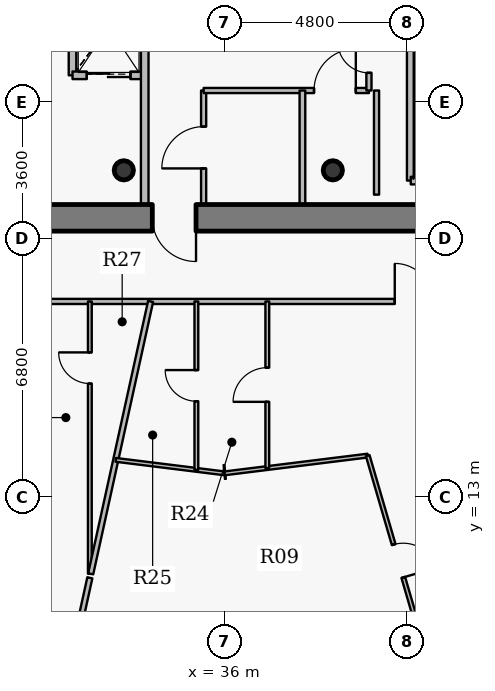
"""IFC4 building model, lengths in metres.
Left out: names, types, materials, properties, quantities, classifications, styles, units other than length and angle.
Written with IfcOpenShell. Run it as: python <this file> out.ifc"""

import sys

from ifc_helpers import new_model, si_unit, direction, frame, frame_2d, origin, origin_2d, place, context, subcontext, project, spatial, rectangle, hollow_circle, extrude, source, transform, mapped, element, fill, save


model = new_model("IFC4")
c1 = context("Model", 3, precision=1e-05, world=origin(), true_north=direction((0.0, 1.0)))
c2 = subcontext(c1, "Body", "Model", "MODEL_VIEW")
j1 = project(units=[si_unit("LENGTHUNIT", "METRE"), si_unit("PLANEANGLEUNIT", "RADIAN")], contexts=[c1])
p1 = place(None, origin())
s1 = spatial("IfcSite", under=j1, at=p1, CompositionType="ELEMENT")
p2 = place(p1, origin())
s2 = spatial("IfcBuilding", under=s1, at=p2, CompositionType="ELEMENT")
p3 = place(p2, frame((0.0, 0.0, 214.05)))
s3 = spatial("IfcBuildingStorey", under=s2, at=p3, CompositionType="ELEMENT", Elevation=214.05)
for number, where, z_axis, x_axis in (
    (1, (33.35, 21.6, 0.0), (0.0, 0.0, 1.0), (1.0, 0.0, 0.0)),
    (2, (38.85, 21.6, 0.0), (0.0, 0.0, 1.0), (1.0, 0.0, 0.0)),
):
    element("IfcColumn", number, at=place(p3, frame(where, z_axis=z_axis, x_axis=x_axis)), inside=s3, PredefinedType="COLUMN", context=c2, shape_type="SweptSolid", body=[
        extrude(hollow_circle(Radius=0.254, WallThickness=0.02, at=origin_2d()), origin(), (0.0, 0.0, 1.0), 3.75),
    ])
p4 = place(p3, frame((44.95, 20.35, 0.0), z_axis=(0.0, 0.0, 1.0), x_axis=(-1.0, 0.0, 0.0)))
e3 = element("IfcWall", 3, at=p4, inside=s3, PredefinedType="SHEAR", context=c2, shape_type="SweptSolid", body=[
    extrude(rectangle(XDim=17.9, YDim=0.7, at=frame_2d((8.95, 0.0))), origin(), (0.0, 0.0, 1.0), 3.05),
])
p5 = place(p4, frame((9.7, 0.0, 0.0)))
e4 = element("IfcOpeningElement", 4, at=p5, cuts=e3, PredefinedType="OPENING", context=c2, shape_type="SweptSolid", body=[
    extrude(rectangle(XDim=1.15, YDim=2.15, at=origin_2d()), frame((0.575, 0.36, 1.075), z_axis=(0.0, -1.0, 0.0), x_axis=(1.0, 0.0, 0.0)), (0.0, 0.0, 1.0), 0.72),
])
p6 = place(p3, frame((24.35, 18.15, 0.0), z_axis=(0.0, 0.0, 1.0), x_axis=(1.0, 0.0, 0.0)))
e5 = element("IfcWall", 5, at=p6, inside=s3, PredefinedType="PARTITIONING", context=c2, shape_type="SweptSolid", body=[
    extrude(rectangle(XDim=23.85, YDim=0.135, at=frame_2d((11.925, 0.0))), origin(), (0.0, 0.0, 1.0), 2.935),
])
p7 = place(p6, frame((2.87, 0.0, 0.0)))
e6 = element("IfcOpeningElement", 6, at=p7, cuts=e5, PredefinedType="OPENING", context=c2, shape_type="SweptSolid", body=[
    extrude(rectangle(XDim=1.0, YDim=2.15, at=origin_2d()), frame((0.5, 0.078, 1.075), z_axis=(0.0, -1.0, 0.0), x_axis=(1.0, 0.0, 0.0)), (0.0, 0.0, 1.0), 0.155),
])
p8 = place(p6, frame((16.13, 0.0, 0.0)))
e7 = element("IfcOpeningElement", 7, at=p8, cuts=e5, PredefinedType="OPENING", context=c2, shape_type="SweptSolid", body=[
    extrude(rectangle(XDim=1.0, YDim=2.15, at=origin_2d()), frame((0.5, 0.078, 1.075), z_axis=(0.0, -1.0, 0.0), x_axis=(1.0, 0.0, 0.0)), (0.0, 0.0, 1.0), 0.155),
])
p9 = place(p3, frame((31.891, 8.307, 0.0), z_axis=(0.0, 0.0, 1.0), x_axis=(0.214700779338, 0.976679873526, 0.0)))
e8 = element("IfcWall", 8, at=p9, inside=s3, PredefinedType="PARTITIONING", context=c2, shape_type="SweptSolid", body=[
    extrude(rectangle(XDim=2.632, YDim=0.135, at=frame_2d((1.316, 0.0))), origin(), (0.0, 0.0, 1.0), 2.985),
])
p10 = place(p3, frame((32.0, 24.1, 0.0), z_axis=(0.0, 0.0, 1.0), x_axis=(0.0, 1.0, 0.0)))
e9 = element("IfcWall", 9, at=p10, inside=s3, PredefinedType="PARTITIONING", context=c2, shape_type="SweptSolid", body=[
    extrude(rectangle(XDim=8.0, YDim=0.2, at=frame_2d((4.0, 0.0))), origin(), (0.0, 0.0, 1.0), 3.5),
])
p11 = place(p3, frame((32.0, 24.1, 0.0), z_axis=(0.0, 0.0, 1.0), x_axis=(1.0, 0.0, 0.0)))
e10 = element("IfcWall", 10, at=p11, inside=s3, PredefinedType="PARTITIONING", context=c2, shape_type="SweptSolid", body=[
    extrude(rectangle(XDim=1.9, YDim=0.2, at=frame_2d((0.95, 0.0))), origin(), (0.0, 0.0, 1.0), 3.085),
])
p12 = place(p11, frame((0.375, 0.0, 0.0)))
e11 = element("IfcOpeningElement", 11, at=p12, cuts=e10, PredefinedType="OPENING", context=c2, shape_type="SweptSolid", body=[
    extrude(rectangle(XDim=1.15, YDim=2.15, at=origin_2d()), frame((0.575, 0.11, 1.075), z_axis=(0.0, -1.0, 0.0), x_axis=(1.0, 0.0, 0.0)), (0.0, 0.0, 1.0), 0.22),
])
p13 = place(p3, frame((32.456, 10.985, 0.0), z_axis=(0.0, 0.0, 1.0), x_axis=(0.0, 1.0, 0.0)))
e12 = element("IfcWall", 12, at=p13, inside=s3, PredefinedType="PARTITIONING", context=c2, shape_type="SweptSolid", body=[
    extrude(rectangle(XDim=7.165, YDim=0.1, at=frame_2d((3.582, 0.0))), origin(), (0.0, 0.0, 1.0), 3.5),
])
p14 = place(p13, frame((5.004, 0.0, 0.0)))
e13 = element("IfcOpeningElement", 13, at=p14, cuts=e12, PredefinedType="OPENING", context=c2, shape_type="SweptSolid", body=[
    extrude(rectangle(XDim=0.82, YDim=2.1, at=origin_2d()), frame((0.41, 0.06, 1.05), z_axis=(0.0, -1.0, 0.0), x_axis=(1.0, 0.0, 0.0)), (0.0, 0.0, 1.0), 0.12),
])
p15 = place(p3, frame((32.479, 10.983, 0.0), z_axis=(0.0, 0.0, 1.0), x_axis=(0.214685976808, 0.976683127407, 0.0)))
e14 = element("IfcWall", 14, at=p15, inside=s3, PredefinedType="PARTITIONING", context=c2, shape_type="SweptSolid", body=[
    extrude(rectangle(XDim=7.338, YDim=0.135, at=frame_2d((3.669, 0.0))), origin(), (0.0, 0.0, 1.0), 3.5),
])
p16 = place(p3, frame((33.138, 13.981, 0.0), z_axis=(0.0, 0.0, 1.0), x_axis=(0.99239465631, -0.123096897311, 0.0)))
e15 = element("IfcWall", 15, at=p16, inside=s3, PredefinedType="PARTITIONING", context=c2, shape_type="SweptSolid", body=[
    extrude(rectangle(XDim=2.884, YDim=0.1, at=frame_2d((1.442, 0.0))), origin(), (0.0, 0.0, 1.0), 2.935),
])
p17 = place(p3, frame((33.9, 20.7, 0.0), z_axis=(0.0, 0.0, 1.0), x_axis=(0.0, 1.0, 0.0)))
e16 = element("IfcWall", 16, at=p17, inside=s3, PredefinedType="PARTITIONING", context=c2, shape_type="SweptSolid", body=[
    extrude(rectangle(XDim=11.4, YDim=0.2, at=frame_2d((5.7, 0.0))), origin(), (0.0, 0.0, 1.0), 3.085),
])
p18 = place(p17, frame((7.08, 0.0, 0.0)))
e17 = element("IfcOpeningElement", 17, at=p18, cuts=e16, PredefinedType="OPENING", context=c2, shape_type="SweptSolid", body=[
    extrude(rectangle(XDim=1.05, YDim=2.15, at=origin_2d()), frame((0.525, 0.11, 1.075), z_axis=(0.0, -1.0, 0.0), x_axis=(1.0, 0.0, 0.0)), (0.0, 0.0, 1.0), 0.22),
])
p19 = place(p17, frame((8.595, 0.0, 0.0)))
e18 = element("IfcOpeningElement", 18, at=p19, cuts=e16, PredefinedType="OPENING", context=c2, shape_type="SweptSolid", body=[
    extrude(rectangle(XDim=1.05, YDim=2.15, at=origin_2d()), frame((0.525, 0.11, 1.075), z_axis=(0.0, -1.0, 0.0), x_axis=(1.0, 0.0, 0.0)), (0.0, 0.0, 1.0), 0.22),
])
p20 = place(p17, frame((10.095, 0.0, 0.0)))
e19 = element("IfcOpeningElement", 19, at=p20, cuts=e16, PredefinedType="OPENING", context=c2, shape_type="SweptSolid", body=[
    extrude(rectangle(XDim=1.05, YDim=2.15, at=origin_2d()), frame((0.525, 0.11, 1.075), z_axis=(0.0, -1.0, 0.0), x_axis=(1.0, 0.0, 0.0)), (0.0, 0.0, 1.0), 0.22),
])
p21 = place(p3, frame((35.259, 13.718, 0.0), z_axis=(0.0, 0.0, 1.0), x_axis=(0.0, 1.0, 0.0)))
e20 = element("IfcWall", 20, at=p21, inside=s3, PredefinedType="PARTITIONING", context=c2, shape_type="SweptSolid", body=[
    extrude(rectangle(XDim=4.432, YDim=0.1, at=frame_2d((2.216, 0.0))), origin(), (0.0, 0.0, 1.0), 3.5),
])
p22 = place(p21, frame((1.806, 0.0, 0.0)))
e21 = element("IfcOpeningElement", 21, at=p22, cuts=e20, PredefinedType="OPENING", context=c2, shape_type="SweptSolid", body=[
    extrude(rectangle(XDim=0.82, YDim=2.1, at=origin_2d()), frame((0.41, 0.06, 1.05), z_axis=(0.0, -1.0, 0.0), x_axis=(1.0, 0.0, 0.0)), (0.0, 0.0, 1.0), 0.12),
])
p23 = place(p3, frame((35.45, 20.7, 0.0), z_axis=(0.0, 0.0, 1.0), x_axis=(0.0, 1.0, 0.0)))
e22 = element("IfcWall", 22, at=p23, inside=s3, PredefinedType="PARTITIONING", context=c2, shape_type="SweptSolid", body=[
    extrude(rectangle(XDim=3.0, YDim=0.135, at=frame_2d((1.5, 0.0))), origin(), (0.0, 0.0, 1.0), 3.085),
])
p24 = place(p23, frame((0.95, 0.0, 0.0)))
e23 = element("IfcOpeningElement", 23, at=p24, cuts=e22, PredefinedType="OPENING", context=c2, shape_type="SweptSolid", body=[
    extrude(rectangle(XDim=1.1, YDim=2.15, at=origin_2d()), frame((0.55, 0.078, 1.075), z_axis=(0.0, -1.0, 0.0), x_axis=(1.0, 0.0, 0.0)), (0.0, 0.0, 1.0), 0.155),
])
p25 = place(p3, frame((35.45, 23.7, 0.0), z_axis=(0.0, 0.0, 1.0), x_axis=(1.0, 0.0, 0.0)))
e24 = element("IfcWall", 24, at=p25, inside=s3, PredefinedType="PARTITIONING", context=c2, shape_type="SweptSolid", body=[
    extrude(rectangle(XDim=4.35, YDim=0.135, at=frame_2d((2.175, 0.0))), origin(), (0.0, 0.0, 1.0), 3.085),
])
p26 = place(p25, frame((2.905, 0.0, 0.0)))
e25 = element("IfcOpeningElement", 25, at=p26, cuts=e24, PredefinedType="OPENING", context=c2, shape_type="SweptSolid", body=[
    extrude(rectangle(XDim=1.1, YDim=2.15, at=origin_2d()), frame((0.55, 0.078, 1.075), z_axis=(0.0, -1.0, 0.0), x_axis=(1.0, 0.0, 0.0)), (0.0, 0.0, 1.0), 0.155),
])
p27 = place(p3, frame((36.0, 13.626, 0.0), z_axis=(0.0, 0.0, 1.0), x_axis=(0.992397118202, 0.123077048159, 0.0)))
e26 = element("IfcWall", 26, at=p27, inside=s3, PredefinedType="PARTITIONING", context=c2, shape_type="SweptSolid", body=[
    extrude(rectangle(XDim=3.797, YDim=0.1, at=frame_2d((1.898, 0.0))), origin(), (0.0, 0.0, 1.0), 2.935),
])
p28 = place(p3, frame((37.126, 13.766, 0.0), z_axis=(0.0, 0.0, 1.0), x_axis=(0.0, 1.0, 0.0)))
e27 = element("IfcWall", 27, at=p28, inside=s3, PredefinedType="PARTITIONING", context=c2, shape_type="SweptSolid", body=[
    extrude(rectangle(XDim=4.384, YDim=0.1, at=frame_2d((2.192, 0.0))), origin(), (0.0, 0.0, 1.0), 3.185),
])
p29 = place(p28, frame((1.742, 0.0, 0.0)))
e28 = element("IfcOpeningElement", 28, at=p29, cuts=e27, PredefinedType="OPENING", context=c2, shape_type="SweptSolid", body=[
    extrude(rectangle(XDim=0.9, YDim=2.1, at=origin_2d()), frame((0.45, 0.06, 1.05), z_axis=(0.0, -1.0, 0.0), x_axis=(1.0, 0.0, 0.0)), (0.0, 0.0, 1.0), 0.12),
])
p30 = place(p3, frame((38.05, 20.18, 0.0), z_axis=(0.0, 0.0, 1.0), x_axis=(0.0, 1.0, 0.0)))
e29 = element("IfcWall", 29, at=p30, inside=s3, PredefinedType="PARTITIONING", context=c2, shape_type="SweptSolid", body=[
    extrude(rectangle(XDim=3.52, YDim=0.15, at=frame_2d((1.76, 0.0))), origin(), (0.0, 0.0, 1.0), 3.035),
])
p31 = place(p3, frame((39.768, 14.094, 0.0), z_axis=(0.0, 0.0, 1.0), x_axis=(0.280219030024, -0.959936089129, 0.0)))
e30 = element("IfcWall", 30, at=p31, inside=s3, PredefinedType="PARTITIONING", context=c2, shape_type="SweptSolid", body=[
    extrude(rectangle(XDim=5.778, YDim=0.1, at=frame_2d((2.889, 0.0))), origin(), (0.0, 0.0, 1.0), 2.985),
])
p32 = place(p31, frame((2.439, 0.0, 0.0)))
e31 = element("IfcOpeningElement", 31, at=p32, cuts=e30, PredefinedType="OPENING", context=c2, shape_type="SweptSolid", body=[
    extrude(rectangle(XDim=0.9, YDim=2.1, at=origin_2d()), frame((0.45, 0.06, 1.05), z_axis=(0.0, -1.0, 0.0), x_axis=(1.0, 0.0, 0.0)), (0.0, 0.0, 1.0), 0.12),
])
p33 = place(p3, frame((39.8, 23.7, 0.0), z_axis=(0.0, 0.0, 1.0), x_axis=(0.0, 1.0, 0.0)))
e32 = element("IfcWall", 32, at=p33, inside=s3, PredefinedType="PARTITIONING", context=c2, shape_type="SweptSolid", body=[
    extrude(rectangle(XDim=1.75, YDim=0.135, at=frame_2d((0.875, 0.0))), origin(), (0.0, 0.0, 1.0), 3.5),
])
p34 = place(p33, frame((0.465, 0.0, 0.0)))
e33 = element("IfcOpeningElement", 33, at=p34, cuts=e32, PredefinedType="OPENING", context=c2, shape_type="SweptSolid", body=[
    extrude(rectangle(XDim=0.82, YDim=2.1, at=origin_2d()), frame((0.41, 0.078, 1.05), z_axis=(0.0, -1.0, 0.0), x_axis=(1.0, 0.0, 0.0)), (0.0, 0.0, 1.0), 0.155),
])
p35 = place(p3, frame((40.9, 21.33, 0.0), z_axis=(0.0, 0.0, 1.0), x_axis=(0.0, 1.0, 0.0)))
e34 = element("IfcWall", 34, at=p35, inside=s3, PredefinedType="PARTITIONING", context=c2, shape_type="SweptSolid", body=[
    extrude(rectangle(XDim=5.91, YDim=0.2, at=frame_2d((2.955, 0.0))), origin(), (0.0, 0.0, 1.0), 3.035),
])
p36 = place(p3, frame((40.9, 21.33, 0.0), z_axis=(0.0, 0.0, 1.0), x_axis=(1.0, 0.0, 0.0)))
e35 = element("IfcWall", 35, at=p36, inside=s3, PredefinedType="PARTITIONING", context=c2, shape_type="SweptSolid", body=[
    extrude(rectangle(XDim=0.25, YDim=0.2, at=frame_2d((0.125, 0.0))), origin(), (0.0, 0.0, 1.0), 3.035),
])
p37 = place(p3, frame((40.0, 23.7, 0.0), z_axis=(0.0, 0.0, 1.0), x_axis=(0.0, -1.0, 0.0)))
e36 = element("IfcWall", 36, at=p37, inside=s3, PredefinedType="PARTITIONING", context=c2, shape_type="SweptSolid", body=[
    extrude(rectangle(XDim=2.74, YDim=0.135, at=frame_2d((1.37, 0.0))), origin(), (0.0, 0.0, 1.0), 3.035),
])
m1 = source(origin(), c2, "Body", "SweptSolid", [
    extrude(rectangle(XDim=1.15, YDim=2.15, at=origin_2d()), frame((0.575, 0.025, 1.075), z_axis=(0.0, -1.0, 0.0), x_axis=(1.0, 0.0, 0.0)), (0.0, 0.0, 1.0), 0.05),
])
p38 = place(p5, origin())
e37 = element("IfcDoor", 37, at=p38, inside=s3, OperationType="SINGLE_SWING_LEFT", PredefinedType="DOOR", context=c2, shape_type="MappedRepresentation", body=[
    mapped(m1, transform((0.0, 0.0, 0.0), x_axis=(1.0, 0.0, 0.0), y_axis=(0.0, 1.0, 0.0), z_axis=(0.0, 0.0, 1.0), scale=1.0)),
])
fill(e4, e37)
m2 = source(origin(), c2, "Body", "SweptSolid", [
    extrude(rectangle(XDim=1.15, YDim=2.15, at=origin_2d()), frame((0.575, 0.025, 1.075), z_axis=(0.0, -1.0, 0.0), x_axis=(1.0, 0.0, 0.0)), (0.0, 0.0, 1.0), 0.05),
])
p39 = place(p12, origin())
e38 = element("IfcDoor", 38, at=p39, inside=s3, OperationType="DOUBLE_DOOR_SLIDING", PredefinedType="USERDEFINED", context=c2, shape_type="MappedRepresentation", body=[
    mapped(m2, transform((0.0, 0.0, 0.0), x_axis=(1.0, 0.0, 0.0), y_axis=(0.0, 1.0, 0.0), z_axis=(0.0, 0.0, 1.0), scale=1.0)),
])
fill(e11, e38)
m3 = source(origin(), c2, "Body", "SweptSolid", [
    extrude(rectangle(XDim=0.82, YDim=2.1, at=origin_2d()), frame((0.41, 0.025, 1.05), z_axis=(0.0, -1.0, 0.0), x_axis=(1.0, 0.0, 0.0)), (0.0, 0.0, 1.0), 0.05),
])
p40 = place(p14, origin())
e39 = element("IfcDoor", 39, at=p40, inside=s3, OperationType="SINGLE_SWING_RIGHT", PredefinedType="DOOR", context=c2, shape_type="MappedRepresentation", body=[
    mapped(m3, transform((0.0, 0.0, 0.0), x_axis=(1.0, 0.0, 0.0), y_axis=(0.0, 1.0, 0.0), z_axis=(0.0, 0.0, 1.0), scale=1.0)),
])
fill(e13, e39)
m4 = source(origin(), c2, "Body", "SweptSolid", [
    extrude(rectangle(XDim=1.0, YDim=2.15, at=origin_2d()), frame((0.5, 0.025, 1.075), z_axis=(0.0, -1.0, 0.0), x_axis=(1.0, 0.0, 0.0)), (0.0, 0.0, 1.0), 0.05),
])
p41 = place(p8, origin())
e40 = element("IfcDoor", 40, at=p41, inside=s3, OperationType="SINGLE_SWING_LEFT", PredefinedType="DOOR", context=c2, shape_type="MappedRepresentation", body=[
    mapped(m4, transform((0.0, 0.0, 0.0), x_axis=(1.0, 0.0, 0.0), y_axis=(0.0, 1.0, 0.0), z_axis=(0.0, 0.0, 1.0), scale=1.0)),
])
fill(e7, e40)
m5 = source(origin(), c2, "Body", "SweptSolid", [
    extrude(rectangle(XDim=0.9, YDim=2.1, at=origin_2d()), frame((0.45, 0.025, 1.05), z_axis=(0.0, -1.0, 0.0), x_axis=(1.0, 0.0, 0.0)), (0.0, 0.0, 1.0), 0.05),
])
p42 = place(p32, origin())
e41 = element("IfcDoor", 41, at=p42, inside=s3, OperationType="SINGLE_SWING_RIGHT", PredefinedType="DOOR", context=c2, shape_type="MappedRepresentation", body=[
    mapped(m5, transform((0.0, 0.0, 0.0), x_axis=(1.0, 0.0, 0.0), y_axis=(0.0, 1.0, 0.0), z_axis=(0.0, 0.0, 1.0), scale=1.0)),
])
fill(e31, e41)
p43 = place(p29, origin())
e42 = element("IfcDoor", 42, at=p43, inside=s3, OperationType="SINGLE_SWING_LEFT", PredefinedType="DOOR", context=c2, shape_type="MappedRepresentation", body=[
    mapped(m5, transform((0.0, 0.0, 0.0), x_axis=(1.0, 0.0, 0.0), y_axis=(0.0, 1.0, 0.0), z_axis=(0.0, 0.0, 1.0), scale=1.0)),
])
fill(e28, e42)
p44 = place(p22, origin())
e43 = element("IfcDoor", 43, at=p44, inside=s3, OperationType="SINGLE_SWING_RIGHT", PredefinedType="DOOR", context=c2, shape_type="MappedRepresentation", body=[
    mapped(m3, transform((0.0, 0.0, 0.0), x_axis=(1.0, 0.0, 0.0), y_axis=(0.0, 1.0, 0.0), z_axis=(0.0, 0.0, 1.0), scale=1.0)),
])
fill(e21, e43)
m6 = source(origin(), c2, "Body", "SweptSolid", [
    extrude(rectangle(XDim=1.1, YDim=2.15, at=origin_2d()), frame((0.55, 0.025, 1.075), z_axis=(0.0, -1.0, 0.0), x_axis=(1.0, 0.0, 0.0)), (0.0, 0.0, 1.0), 0.05),
])
p45 = place(p24, origin())
e44 = element("IfcDoor", 44, at=p45, inside=s3, OperationType="SINGLE_SWING_LEFT", PredefinedType="DOOR", context=c2, shape_type="MappedRepresentation", body=[
    mapped(m6, transform((0.0, 0.0, 0.0), x_axis=(1.0, 0.0, 0.0), y_axis=(0.0, 1.0, 0.0), z_axis=(0.0, 0.0, 1.0), scale=1.0)),
])
fill(e23, e44)
p46 = place(p26, origin())
e45 = element("IfcDoor", 45, at=p46, inside=s3, OperationType="SINGLE_SWING_RIGHT", PredefinedType="DOOR", context=c2, shape_type="MappedRepresentation", body=[
    mapped(m6, transform((0.0, 0.0, 0.0), x_axis=(1.0, 0.0, 0.0), y_axis=(0.0, 1.0, 0.0), z_axis=(0.0, 0.0, 1.0), scale=1.0)),
])
fill(e25, e45)
p47 = place(p34, origin())
e46 = element("IfcDoor", 46, at=p47, inside=s3, OperationType="SINGLE_SWING_RIGHT", PredefinedType="DOOR", context=c2, shape_type="MappedRepresentation", body=[
    mapped(m3, transform((0.0, 0.0, 0.0), x_axis=(1.0, 0.0, 0.0), y_axis=(0.0, 1.0, 0.0), z_axis=(0.0, 0.0, 1.0), scale=1.0)),
])
fill(e33, e46)
save(model, sys.argv[1])
